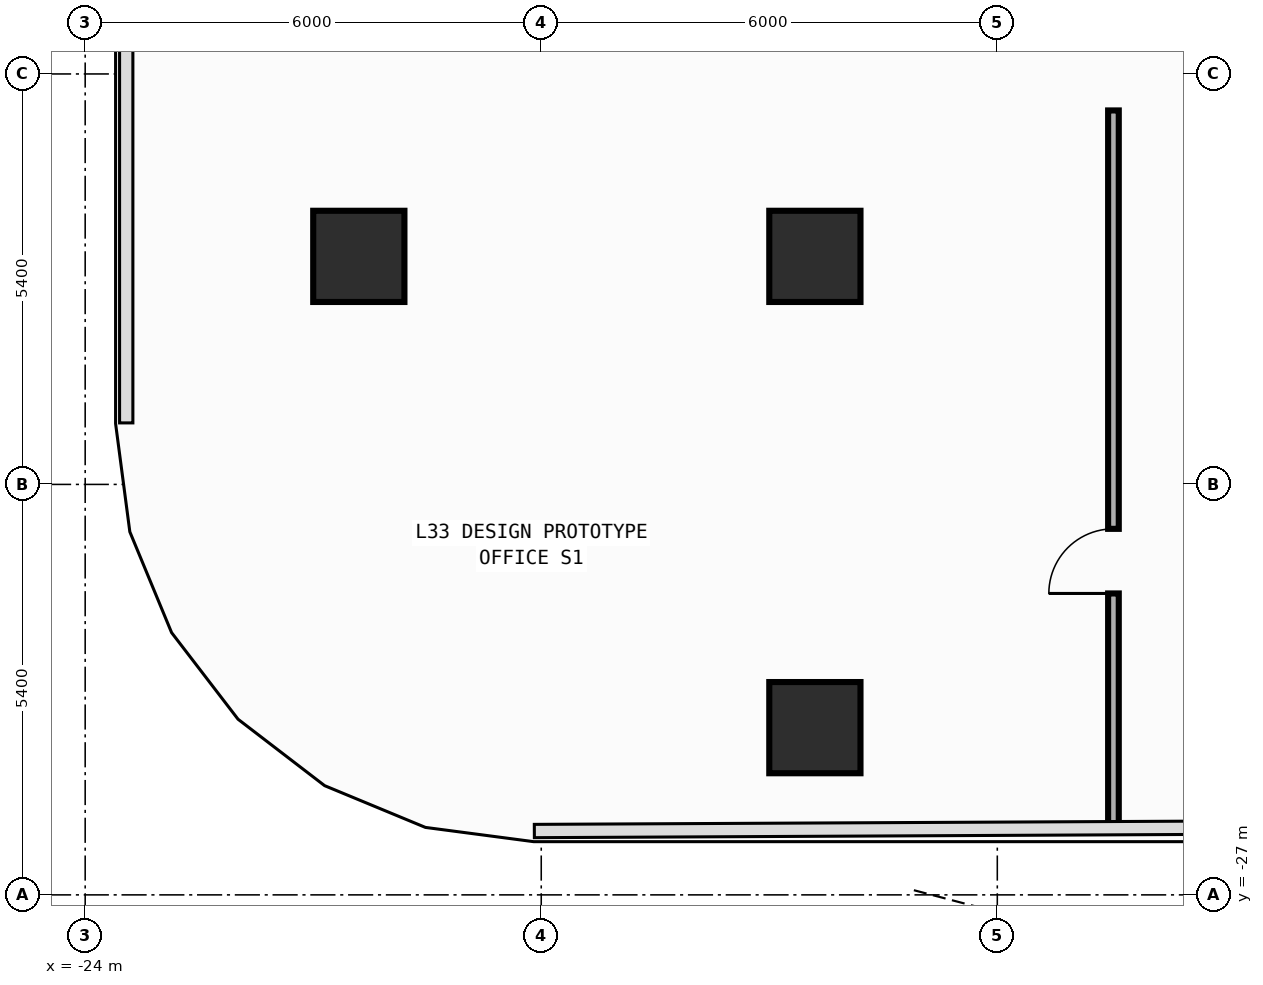
"""IFC4 building model, lengths in metres.
Left out: names, types, materials, properties, quantities, classifications, styles, units other than length and angle.
Written with IfcOpenShell. Run it as: python <this file> out.ifc"""

import sys

from ifc_helpers import new_model, si_unit, direction, frame, frame_2d, origin, origin_2d, place, context, subcontext, project, spatial, rectangle, extrude, element, fill, save


model = new_model("IFC4")
c1 = context("Model", 3, precision=1e-05, world=origin(), true_north=direction((0.0, 1.0)))
c2 = subcontext(c1, "Body", "Model", "MODEL_VIEW")
j1 = project(units=[si_unit("LENGTHUNIT", "METRE"), si_unit("PLANEANGLEUNIT", "RADIAN")], contexts=[c1])
p1 = place(None, origin())
s1 = spatial("IfcSite", under=j1, at=p1, CompositionType="ELEMENT")
p2 = place(p1, origin())
s2 = spatial("IfcBuilding", under=s1, at=p2, CompositionType="ELEMENT")
p3 = place(p2, frame((0.0, 0.0, 143.6)))
s3 = spatial("IfcBuildingStorey", under=s2, at=p3, CompositionType="ELEMENT", Elevation=143.6)
for number, where, z_axis, x_axis in (
    (1, (-20.4, -18.6, 0.0), (0.0, 0.0, 1.0), (1.0, 0.0, 0.0)),
    (2, (-14.4, -18.6, 0.0), (0.0, 0.0, 1.0), (1.0, 0.0, 0.0)),
    (3, (-14.4, -24.8, 0.0), (0.0, 0.0, 1.0), (1.0, 0.0, 0.0)),
):
    element("IfcColumn", number, at=place(p3, frame(where, z_axis=z_axis, x_axis=x_axis)), inside=s3, PredefinedType="COLUMN", context=c2, shape_type="SweptSolid", body=[
        extrude(rectangle(XDim=1.2, YDim=1.2, at=origin_2d()), origin(), (0.0, 0.0, 1.0), 4.2),
    ])
p4 = place(p3, frame((-10.472, -26.118, 0.0), z_axis=(0.0, 0.0, 1.0), x_axis=(0.0, 1.0, 0.0)))
e4 = element("IfcWall", 4, at=p4, inside=s3, PredefinedType="PARTITIONING", context=c2, shape_type="SweptSolid", body=[
    extrude(rectangle(XDim=9.438, YDim=0.14, at=frame_2d((4.719, 0.0))), origin(), (0.0, 0.0, 1.0), 3.94),
])
p5 = place(p4, frame((3.083, 0.0, 0.0)))
e5 = element("IfcOpeningElement", 5, at=p5, cuts=e4, PredefinedType="OPENING", context=c2, shape_type="SweptSolid", body=[
    extrude(rectangle(XDim=0.85, YDim=2.1, at=frame_2d((0.425, 1.05))), frame((0.0, 0.08, 0.0), z_axis=(0.0, -1.0, 0.0), x_axis=(1.0, 0.0, 0.0)), (0.0, 0.0, 1.0), 0.16),
])
p6 = place(p5, origin())
e6 = element("IfcDoor", 6, at=p6, inside=s3, OperationType="SINGLE_SWING_LEFT", PredefinedType="DOOR", context=c2, shape_type="SweptSolid", body=[
    extrude(rectangle(XDim=0.85, YDim=2.1, at=frame_2d((0.425, 1.05))), frame((0.0, 0.025, 0.0), z_axis=(0.0, -1.0, 0.0), x_axis=(1.0, 0.0, 0.0)), (0.0, 0.0, 1.0), 0.05),
])
fill(e5, e6)
save(model, sys.argv[1])
